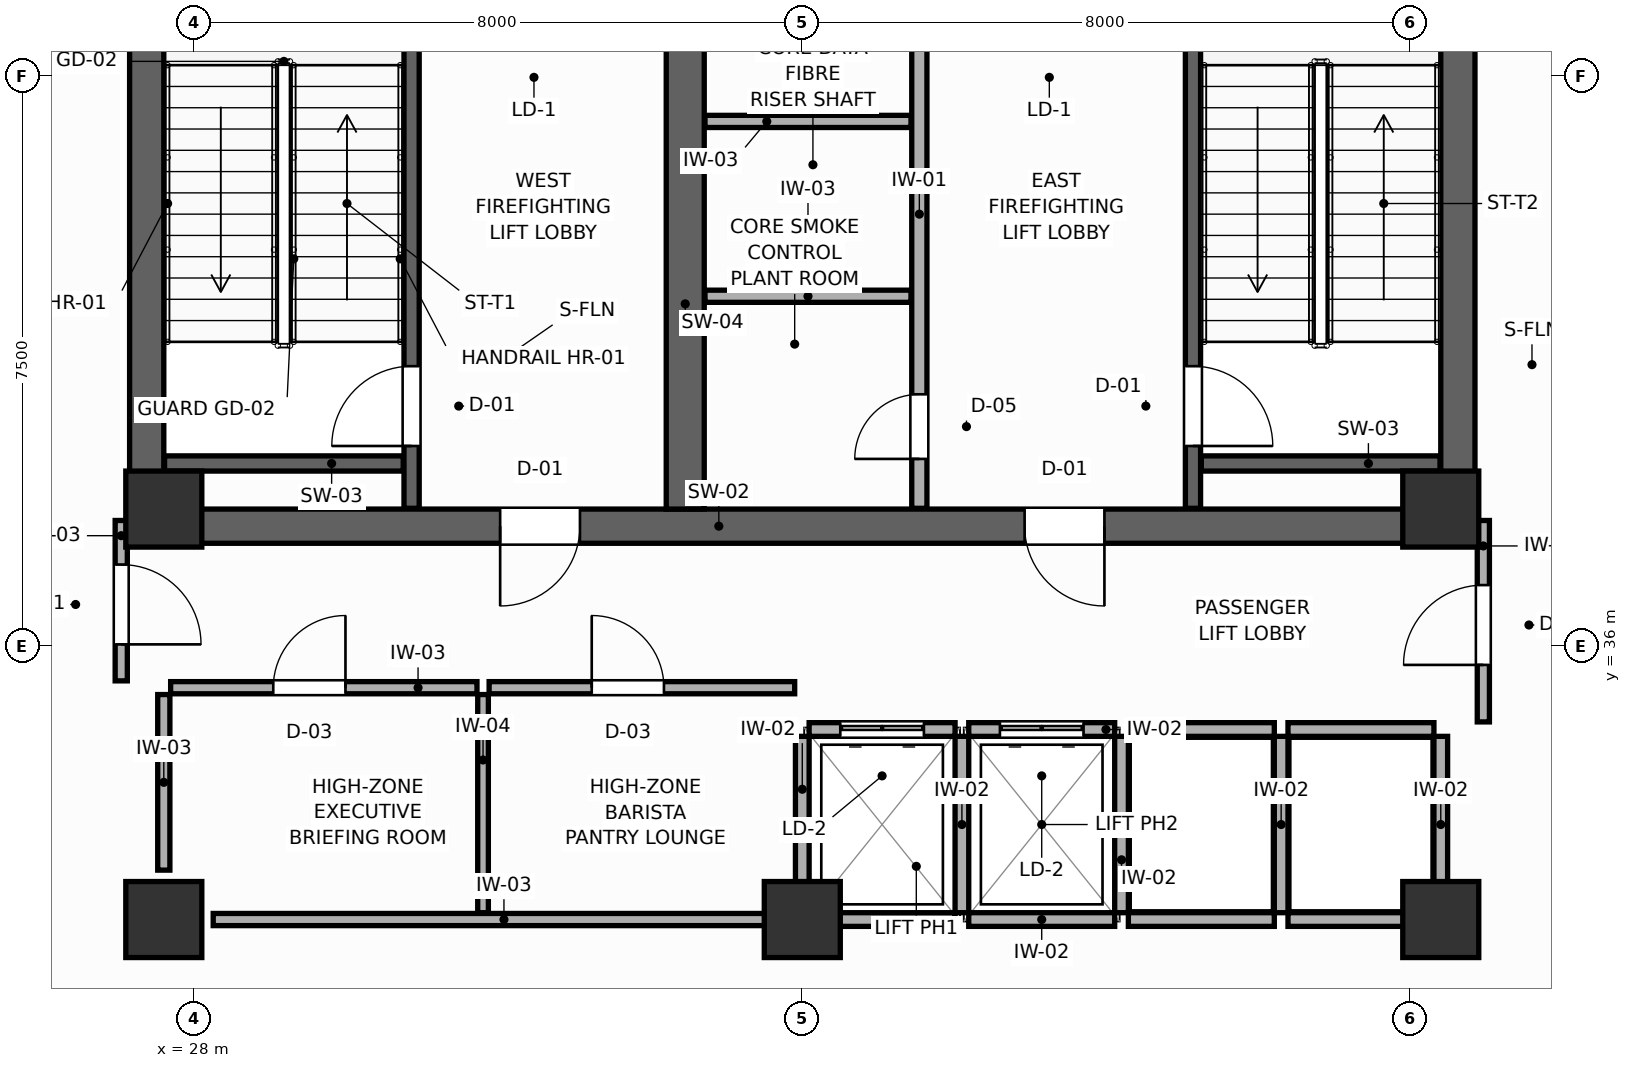
"""IFC4 building model, lengths in metres.
Left out: names, types, materials, properties, quantities, classifications, styles, units other than length and angle.
Written with IfcOpenShell. Run it as: python <this file> out.ifc"""

import sys

from ifc_helpers import new_model, si_unit, direction, frame, frame_2d, origin, origin_2d, place, context, subcontext, project, spatial, rectangle, extrude, source, transform, mapped, element, fill, save


model = new_model("IFC4")
c1 = context("Model", 3, precision=1e-05, world=origin(), true_north=direction((0.0, 1.0)))
c2 = subcontext(c1, "Body", "Model", "MODEL_VIEW")
j1 = project(units=[si_unit("LENGTHUNIT", "METRE"), si_unit("PLANEANGLEUNIT", "RADIAN")], contexts=[c1])
p1 = place(None, origin())
s1 = spatial("IfcSite", under=j1, at=p1, CompositionType="ELEMENT")
p2 = place(p1, origin())
s2 = spatial("IfcBuilding", under=s1, at=p2, CompositionType="ELEMENT")
p3 = place(p2, frame((0.0, 0.0, 201.0)))
s3 = spatial("IfcBuildingStorey", under=s2, at=p3, CompositionType="ELEMENT", Elevation=201.0)
p4 = place(p3, frame((27.15, 37.575, 0.0), z_axis=(0.0, 0.0, 1.0), x_axis=(1.0, 0.0, 0.0)))
e1 = element("IfcWall", 1, at=p4, inside=s3, PredefinedType="SHEAR", context=c2, shape_type="SweptSolid", body=[
    extrude(rectangle(XDim=17.7, YDim=0.45, at=frame_2d((8.85, 0.0))), origin(), (0.0, 0.0, 1.0), 4.8),
])
p5 = place(p4, frame((4.875, 0.0, 0.0)))
e2 = element("IfcOpeningElement", 2, at=p5, cuts=e1, PredefinedType="OPENING", context=c2, shape_type="SweptSolid", body=[
    extrude(rectangle(XDim=1.05, YDim=2.1, at=frame_2d((0.525, 1.05))), frame((0.0, 0.235, 0.0), z_axis=(0.0, -1.0, 0.0), x_axis=(1.0, 0.0, 0.0)), (0.0, 0.0, 1.0), 0.47),
])
p6 = place(p4, frame((11.775, 0.0, 0.0)))
e3 = element("IfcOpeningElement", 3, at=p6, cuts=e1, PredefinedType="OPENING", context=c2, shape_type="SweptSolid", body=[
    extrude(rectangle(XDim=1.05, YDim=2.1, at=frame_2d((0.525, 1.05))), frame((0.0, 0.235, 0.0), z_axis=(0.0, -1.0, 0.0), x_axis=(1.0, 0.0, 0.0)), (0.0, 0.0, 1.0), 0.47),
])
for number, where, z_axis, x_axis in (
    (4, (27.375, 37.8, 0.0), (0.0, 0.0, 1.0), (0.0, 1.0, 0.0)),
    (5, (44.625, 37.8, 0.0), (0.0, 0.0, 1.0), (0.0, 1.0, 0.0)),
):
    element("IfcWall", number, at=place(p3, frame(where, z_axis=z_axis, x_axis=x_axis)), inside=s3, PredefinedType="SHEAR", context=c2, shape_type="SweptSolid", body=[
        extrude(rectangle(XDim=9.0, YDim=0.45, at=frame_2d((4.5, 0.0))), origin(), (0.0, 0.0, 1.0), 4.8),
    ])
p7 = place(p3, frame((34.46, 37.8, 0.0), z_axis=(0.0, 0.0, 1.0), x_axis=(0.0, 1.0, 0.0)))
e6 = element("IfcWall", 6, at=p7, inside=s3, PredefinedType="SHEAR", context=c2, shape_type="SweptSolid", body=[
    extrude(rectangle(XDim=9.0, YDim=0.5, at=frame_2d((4.5, 0.0))), origin(), (0.0, 0.0, 1.0), 4.61),
])
m1 = source(origin(), c2, "Body", "SweptSolid", [
    extrude(rectangle(XDim=1.0, YDim=1.0, at=origin_2d()), origin(), (0.0, 0.0, 1.0), 4.8),
])
for number, where, z_axis, x_axis in (
    (7, (27.6, 37.8, 0.0), (0.0, 0.0, 1.0), (1.0, 0.0, 0.0)),
    (8, (44.4, 37.8, 0.0), (0.0, 0.0, 1.0), (1.0, 0.0, 0.0)),
    (9, (27.6, 32.4, 0.0), (0.0, 0.0, 1.0), (1.0, 0.0, 0.0)),
    (10, (44.4, 32.4, 0.0), (0.0, 0.0, 1.0), (1.0, 0.0, 0.0)),
    (11, (36.0, 32.4, 0.0), (0.0, 0.0, 1.0), (1.0, 0.0, 0.0)),
):
    element("IfcColumn", number, at=place(p3, frame(where, z_axis=z_axis, x_axis=x_axis)), inside=s3, PredefinedType="COLUMN", context=c2, shape_type="MappedRepresentation", body=[
        mapped(m1, transform((0.0, 0.0, 0.0), scale=1.0)),
    ])
p8 = place(p3, frame((30.86, 37.81, 0.0), z_axis=(0.0, 0.0, 1.0), x_axis=(0.0, 1.0, 0.0)))
e12 = element("IfcWall", 12, at=p8, inside=s3, PredefinedType="SHEAR", context=c2, shape_type="SweptSolid", body=[
    extrude(rectangle(XDim=8.98, YDim=0.2, at=frame_2d((4.49, 0.0))), origin(), (0.0, 0.0, 1.0), 4.8),
])
p9 = place(p8, frame((0.82, 0.0, 0.0)))
e13 = element("IfcOpeningElement", 13, at=p9, cuts=e12, PredefinedType="OPENING", context=c2, shape_type="SweptSolid", body=[
    extrude(rectangle(XDim=1.05, YDim=2.1, at=frame_2d((0.525, 1.05))), frame((0.0, 0.11, 0.0), z_axis=(0.0, -1.0, 0.0), x_axis=(1.0, 0.0, 0.0)), (0.0, 0.0, 1.0), 0.22),
])
p10 = place(p3, frame((27.61, 38.4, 0.0), z_axis=(0.0, 0.0, 1.0), x_axis=(1.0, 0.0, 0.0)))
e14 = element("IfcWall", 14, at=p10, inside=s3, PredefinedType="SHEAR", context=c2, shape_type="SweptSolid", body=[
    extrude(rectangle(XDim=3.14, YDim=0.2, at=frame_2d((1.57, 0.0))), origin(), (0.0, 0.0, 1.0), 4.8),
])
p11 = place(p3, frame((41.14, 37.81, 0.0), z_axis=(0.0, 0.0, 1.0), x_axis=(0.0, 1.0, 0.0)))
e15 = element("IfcWall", 15, at=p11, inside=s3, PredefinedType="SHEAR", context=c2, shape_type="SweptSolid", body=[
    extrude(rectangle(XDim=8.98, YDim=0.2, at=frame_2d((4.49, 0.0))), origin(), (0.0, 0.0, 1.0), 4.8),
])
p12 = place(p11, frame((0.82, 0.0, 0.0)))
e16 = element("IfcOpeningElement", 16, at=p12, cuts=e15, PredefinedType="OPENING", context=c2, shape_type="SweptSolid", body=[
    extrude(rectangle(XDim=1.05, YDim=2.1, at=frame_2d((0.525, 1.05))), frame((0.0, 0.11, 0.0), z_axis=(0.0, -1.0, 0.0), x_axis=(1.0, 0.0, 0.0)), (0.0, 0.0, 1.0), 0.22),
])
p13 = place(p3, frame((41.25, 38.4, 0.0), z_axis=(0.0, 0.0, 1.0), x_axis=(1.0, 0.0, 0.0)))
e17 = element("IfcWall", 17, at=p13, inside=s3, PredefinedType="SHEAR", context=c2, shape_type="SweptSolid", body=[
    extrude(rectangle(XDim=3.14, YDim=0.2, at=frame_2d((1.57, 0.0))), origin(), (0.0, 0.0, 1.0), 4.8),
])
p14 = place(p3, frame((37.54, 37.81, 0.0), z_axis=(0.0, 0.0, 1.0), x_axis=(0.0, 1.0, 0.0)))
e18 = element("IfcWall", 18, at=p14, inside=s3, PredefinedType="PARTITIONING", context=c2, shape_type="SweptSolid", body=[
    extrude(rectangle(XDim=8.98, YDim=0.2, at=frame_2d((4.49, 0.0))), origin(), (0.0, 0.0, 1.0), 4.61),
])
p15 = place(p14, frame((0.65, 0.0, 0.0)))
e19 = element("IfcOpeningElement", 19, at=p15, cuts=e18, PredefinedType="OPENING", context=c2, shape_type="SweptSolid", body=[
    extrude(rectangle(XDim=0.85, YDim=2.05, at=frame_2d((0.425, 1.025))), frame((0.0, 0.11, 0.0), z_axis=(0.0, -1.0, 0.0), x_axis=(1.0, 0.0, 0.0)), (0.0, 0.0, 1.0), 0.22),
])
for number, where, z_axis, x_axis in (
    (20, (34.72, 40.6, 0.0), (0.0, 0.0, 1.0), (1.0, 0.0, 0.0)),
    (21, (34.72, 42.9, 0.0), (0.0, 0.0, 1.0), (1.0, 0.0, 0.0)),
):
    element("IfcWall", number, at=place(p3, frame(where, z_axis=z_axis, x_axis=x_axis)), inside=s3, PredefinedType="PARTITIONING", context=c2, shape_type="SweptSolid", body=[
        extrude(rectangle(XDim=2.71, YDim=0.16, at=frame_2d((1.355, 0.0))), origin(), (0.0, 0.0, 1.0), 4.61),
    ])
p16 = place(p3, frame((36.09, 34.9, 0.0), z_axis=(0.0, 0.0, 1.0), x_axis=(1.0, 0.0, 0.0)))
e22 = element("IfcWall", 22, at=p16, inside=s3, PredefinedType="PARTITIONING", context=c2, shape_type="SweptSolid", body=[
    extrude(rectangle(XDim=1.92, YDim=0.18, at=frame_2d((0.96, 0.0))), origin(), (0.0, 0.0, 1.0), 4.61),
])
p17 = place(p16, frame((0.41, 0.0, 0.0)))
e23 = element("IfcOpeningElement", 23, at=p17, cuts=e22, PredefinedType="OPENING", context=c2, shape_type="SweptSolid", body=[
    extrude(rectangle(XDim=1.1, YDim=2.1, at=frame_2d((0.55, 1.05))), frame((0.0, 0.1, 0.0), z_axis=(0.0, -1.0, 0.0), x_axis=(1.0, 0.0, 0.0)), (0.0, 0.0, 1.0), 0.2),
])
p18 = place(p3, frame((36.09, 32.4, 0.0), z_axis=(0.0, 0.0, 1.0), x_axis=(1.0, 0.0, 0.0)))
e24 = element("IfcWall", 24, at=p18, inside=s3, PredefinedType="PARTITIONING", context=c2, shape_type="SweptSolid", body=[
    extrude(rectangle(XDim=1.92, YDim=0.18, at=frame_2d((0.96, 0.0))), origin(), (0.0, 0.0, 1.0), 2.57),
])
p19 = place(p3, frame((36.0, 32.49, 0.0), z_axis=(0.0, 0.0, 1.0), x_axis=(0.0, 1.0, 0.0)))
e25 = element("IfcWall", 25, at=p19, inside=s3, PredefinedType="PARTITIONING", context=c2, shape_type="SweptSolid", body=[
    extrude(rectangle(XDim=2.32, YDim=0.18, at=frame_2d((1.16, 0.0))), origin(), (0.0, 0.0, 1.0), 4.61),
])
p20 = place(p3, frame((38.19, 34.9, 0.0), z_axis=(0.0, 0.0, 1.0), x_axis=(1.0, 0.0, 0.0)))
e26 = element("IfcWall", 26, at=p20, inside=s3, PredefinedType="PARTITIONING", context=c2, shape_type="SweptSolid", body=[
    extrude(rectangle(XDim=1.92, YDim=0.18, at=frame_2d((0.96, 0.0))), origin(), (0.0, 0.0, 1.0), 4.61),
])
p21 = place(p20, frame((0.41, 0.0, 0.0)))
e27 = element("IfcOpeningElement", 27, at=p21, cuts=e26, PredefinedType="OPENING", context=c2, shape_type="SweptSolid", body=[
    extrude(rectangle(XDim=1.1, YDim=2.1, at=frame_2d((0.55, 1.05))), frame((0.0, 0.1, 0.0), z_axis=(0.0, -1.0, 0.0), x_axis=(1.0, 0.0, 0.0)), (0.0, 0.0, 1.0), 0.2),
])
p22 = place(p3, frame((38.19, 32.4, 0.0), z_axis=(0.0, 0.0, 1.0), x_axis=(1.0, 0.0, 0.0)))
e28 = element("IfcWall", 28, at=p22, inside=s3, PredefinedType="PARTITIONING", context=c2, shape_type="SweptSolid", body=[
    extrude(rectangle(XDim=1.92, YDim=0.18, at=frame_2d((0.96, 0.0))), origin(), (0.0, 0.0, 1.0), 2.57),
])
p23 = place(p3, frame((38.1, 32.49, 0.0), z_axis=(0.0, 0.0, 1.0), x_axis=(0.0, 1.0, 0.0)))
e29 = element("IfcWall", 29, at=p23, inside=s3, PredefinedType="PARTITIONING", context=c2, shape_type="SweptSolid", body=[
    extrude(rectangle(XDim=2.32, YDim=0.18, at=frame_2d((1.16, 0.0))), origin(), (0.0, 0.0, 1.0), 4.61),
])
p24 = place(p3, frame((40.29, 34.9, 0.0), z_axis=(0.0, 0.0, 1.0), x_axis=(1.0, 0.0, 0.0)))
e30 = element("IfcWall", 30, at=p24, inside=s3, PredefinedType="PARTITIONING", context=c2, shape_type="SweptSolid", body=[
    extrude(rectangle(XDim=1.92, YDim=0.18, at=frame_2d((0.96, 0.0))), origin(), (0.0, 0.0, 1.0), 4.61),
])
p25 = place(p3, frame((40.29, 32.4, 0.0), z_axis=(0.0, 0.0, 1.0), x_axis=(1.0, 0.0, 0.0)))
e31 = element("IfcWall", 31, at=p25, inside=s3, PredefinedType="PARTITIONING", context=c2, shape_type="SweptSolid", body=[
    extrude(rectangle(XDim=1.92, YDim=0.18, at=frame_2d((0.96, 0.0))), origin(), (0.0, 0.0, 1.0), 2.57),
])
p26 = place(p3, frame((40.2, 32.49, 0.0), z_axis=(0.0, 0.0, 1.0), x_axis=(0.0, 1.0, 0.0)))
e32 = element("IfcWall", 32, at=p26, inside=s3, PredefinedType="PARTITIONING", context=c2, shape_type="SweptSolid", body=[
    extrude(rectangle(XDim=2.32, YDim=0.18, at=frame_2d((1.16, 0.0))), origin(), (0.0, 0.0, 1.0), 4.61),
])
p27 = place(p3, frame((42.39, 34.9, 0.0), z_axis=(0.0, 0.0, 1.0), x_axis=(1.0, 0.0, 0.0)))
e33 = element("IfcWall", 33, at=p27, inside=s3, PredefinedType="PARTITIONING", context=c2, shape_type="SweptSolid", body=[
    extrude(rectangle(XDim=1.92, YDim=0.18, at=frame_2d((0.96, 0.0))), origin(), (0.0, 0.0, 1.0), 4.61),
])
p28 = place(p3, frame((42.39, 32.4, 0.0), z_axis=(0.0, 0.0, 1.0), x_axis=(1.0, 0.0, 0.0)))
e34 = element("IfcWall", 34, at=p28, inside=s3, PredefinedType="PARTITIONING", context=c2, shape_type="SweptSolid", body=[
    extrude(rectangle(XDim=1.92, YDim=0.18, at=frame_2d((0.96, 0.0))), origin(), (0.0, 0.0, 1.0), 2.57),
])
for number, where, z_axis, x_axis in (
    (35, (42.3, 32.49, 0.0), (0.0, 0.0, 1.0), (0.0, 1.0, 0.0)),
    (36, (44.4, 32.49, 0.0), (0.0, 0.0, 1.0), (0.0, 1.0, 0.0)),
):
    element("IfcWall", number, at=place(p3, frame(where, z_axis=z_axis, x_axis=x_axis)), inside=s3, PredefinedType="PARTITIONING", context=c2, shape_type="SweptSolid", body=[
        extrude(rectangle(XDim=2.32, YDim=0.18, at=frame_2d((1.16, 0.0))), origin(), (0.0, 0.0, 1.0), 4.61),
    ])
p29 = place(p3, frame((28.25, 32.4, 0.0), z_axis=(0.0, 0.0, 1.0), x_axis=(1.0, 0.0, 0.0)))
e37 = element("IfcWall", 37, at=p29, inside=s3, PredefinedType="PARTITIONING", context=c2, shape_type="SweptSolid", body=[
    extrude(rectangle(XDim=7.65, YDim=0.16, at=frame_2d((3.825, 0.0))), origin(), (0.0, 0.0, 1.0), 2.57),
])
p30 = place(p3, frame((27.6, 33.05, 0.0), z_axis=(0.0, 0.0, 1.0), x_axis=(0.0, 1.0, 0.0)))
e38 = element("IfcWall", 38, at=p30, inside=s3, PredefinedType="PARTITIONING", context=c2, shape_type="SweptSolid", body=[
    extrude(rectangle(XDim=2.31, YDim=0.16, at=frame_2d((1.155, 0.0))), origin(), (0.0, 0.0, 1.0), 4.61),
])
p31 = place(p3, frame((31.8, 32.49, 0.0), z_axis=(0.0, 0.0, 1.0), x_axis=(0.0, 1.0, 0.0)))
e39 = element("IfcWall", 39, at=p31, inside=s3, PredefinedType="PARTITIONING", context=c2, shape_type="SweptSolid", body=[
    extrude(rectangle(XDim=2.87, YDim=0.14, at=frame_2d((1.435, 0.0))), origin(), (0.0, 0.0, 1.0), 4.61),
])
p32 = place(p3, frame((27.69, 35.45, 0.0), z_axis=(0.0, 0.0, 1.0), x_axis=(1.0, 0.0, 0.0)))
e40 = element("IfcWall", 40, at=p32, inside=s3, PredefinedType="PARTITIONING", context=c2, shape_type="SweptSolid", body=[
    extrude(rectangle(XDim=4.03, YDim=0.16, at=frame_2d((2.015, 0.0))), origin(), (0.0, 0.0, 1.0), 4.61),
])
p33 = place(p32, frame((1.35, 0.0, 0.0)))
e41 = element("IfcOpeningElement", 41, at=p33, cuts=e40, PredefinedType="OPENING", context=c2, shape_type="SweptSolid", body=[
    extrude(rectangle(XDim=0.95, YDim=2.05, at=frame_2d((0.475, 1.025))), frame((0.0, 0.09, 0.0), z_axis=(0.0, -1.0, 0.0), x_axis=(1.0, 0.0, 0.0)), (0.0, 0.0, 1.0), 0.18),
])
p34 = place(p3, frame((31.88, 35.45, 0.0), z_axis=(0.0, 0.0, 1.0), x_axis=(1.0, 0.0, 0.0)))
e42 = element("IfcWall", 42, at=p34, inside=s3, PredefinedType="PARTITIONING", context=c2, shape_type="SweptSolid", body=[
    extrude(rectangle(XDim=4.02, YDim=0.16, at=frame_2d((2.01, 0.0))), origin(), (0.0, 0.0, 1.0), 4.61),
])
p35 = place(p34, frame((1.35, 0.0, 0.0)))
e43 = element("IfcOpeningElement", 43, at=p35, cuts=e42, PredefinedType="OPENING", context=c2, shape_type="SweptSolid", body=[
    extrude(rectangle(XDim=0.95, YDim=2.05, at=frame_2d((0.475, 1.025))), frame((0.0, 0.09, 0.0), z_axis=(0.0, -1.0, 0.0), x_axis=(1.0, 0.0, 0.0)), (0.0, 0.0, 1.0), 0.18),
])
p36 = place(p3, frame((27.04, 35.54, 0.0), z_axis=(0.0, 0.0, 1.0), x_axis=(0.0, 1.0, 0.0)))
e44 = element("IfcWall", 44, at=p36, inside=s3, PredefinedType="PARTITIONING", context=c2, shape_type="SweptSolid", body=[
    extrude(rectangle(XDim=2.11, YDim=0.16, at=frame_2d((1.055, 0.0))), origin(), (0.0, 0.0, 1.0), 4.61),
])
p37 = place(p36, frame((0.48, 0.0, 0.0)))
e45 = element("IfcOpeningElement", 45, at=p37, cuts=e44, PredefinedType="OPENING", context=c2, shape_type="SweptSolid", body=[
    extrude(rectangle(XDim=1.05, YDim=2.1, at=frame_2d((0.525, 1.05))), frame((0.0, 0.09, 0.0), z_axis=(0.0, -1.0, 0.0), x_axis=(1.0, 0.0, 0.0)), (0.0, 0.0, 1.0), 0.18),
])
p38 = place(p3, frame((44.96, 35.0, 0.0), z_axis=(0.0, 0.0, 1.0), x_axis=(0.0, 1.0, 0.0)))
e46 = element("IfcWall", 46, at=p38, inside=s3, PredefinedType="PARTITIONING", context=c2, shape_type="SweptSolid", body=[
    extrude(rectangle(XDim=2.65, YDim=0.16, at=frame_2d((1.325, 0.0))), origin(), (0.0, 0.0, 1.0), 4.61),
])
p39 = place(p38, frame((0.75, 0.0, 0.0)))
e47 = element("IfcOpeningElement", 47, at=p39, cuts=e46, PredefinedType="OPENING", context=c2, shape_type="SweptSolid", body=[
    extrude(rectangle(XDim=1.05, YDim=2.1, at=frame_2d((0.525, 1.05))), frame((0.0, 0.09, 0.0), z_axis=(0.0, -1.0, 0.0), x_axis=(1.0, 0.0, 0.0)), (0.0, 0.0, 1.0), 0.18),
])
p40 = place(p9, origin())
e48 = element("IfcDoor", 48, at=p40, inside=s3, OperationType="SINGLE_SWING_LEFT", PredefinedType="DOOR", context=c2, shape_type="SweptSolid", body=[
    extrude(rectangle(XDim=1.05, YDim=2.1, at=frame_2d((0.525, 1.05))), frame((0.0, 0.025, 0.0), z_axis=(0.0, -1.0, 0.0), x_axis=(1.0, 0.0, 0.0)), (0.0, 0.0, 1.0), 0.05),
])
fill(e13, e48)
p41 = place(p12, frame((1.05, 0.0, 0.0), z_axis=(0.0, 0.0, 1.0), x_axis=(-1.0, 0.0, 0.0)))
e49 = element("IfcDoor", 49, at=p41, inside=s3, OperationType="SINGLE_SWING_RIGHT", PredefinedType="DOOR", context=c2, shape_type="SweptSolid", body=[
    extrude(rectangle(XDim=1.05, YDim=2.1, at=frame_2d((0.525, 1.05))), frame((0.0, 0.025, 0.0), z_axis=(0.0, -1.0, 0.0), x_axis=(1.0, 0.0, 0.0)), (0.0, 0.0, 1.0), 0.05),
])
fill(e16, e49)
p42 = place(p15, origin())
e50 = element("IfcDoor", 50, at=p42, inside=s3, OperationType="SINGLE_SWING_LEFT", PredefinedType="DOOR", context=c2, shape_type="SweptSolid", body=[
    extrude(rectangle(XDim=0.85, YDim=2.05, at=frame_2d((0.425, 1.025))), frame((0.0, 0.025, 0.0), z_axis=(0.0, -1.0, 0.0), x_axis=(1.0, 0.0, 0.0)), (0.0, 0.0, 1.0), 0.05),
])
fill(e19, e50)
p43 = place(p17, origin())
e51 = element("IfcDoor", 51, at=p43, inside=s3, OperationType="DOUBLE_DOOR_SLIDING", PredefinedType="DOOR", context=c2, shape_type="SweptSolid", body=[
    extrude(rectangle(XDim=1.1, YDim=2.1, at=frame_2d((0.55, 1.05))), frame((0.0, 0.025, 0.0), z_axis=(0.0, -1.0, 0.0), x_axis=(1.0, 0.0, 0.0)), (0.0, 0.0, 1.0), 0.05),
])
fill(e23, e51)
p44 = place(p21, origin())
e52 = element("IfcDoor", 52, at=p44, inside=s3, OperationType="DOUBLE_DOOR_SLIDING", PredefinedType="DOOR", context=c2, shape_type="SweptSolid", body=[
    extrude(rectangle(XDim=1.1, YDim=2.1, at=frame_2d((0.55, 1.05))), frame((0.0, 0.025, 0.0), z_axis=(0.0, -1.0, 0.0), x_axis=(1.0, 0.0, 0.0)), (0.0, 0.0, 1.0), 0.05),
])
fill(e27, e52)
p45 = place(p33, origin())
e53 = element("IfcDoor", 53, at=p45, inside=s3, OperationType="SINGLE_SWING_RIGHT", PredefinedType="DOOR", context=c2, shape_type="SweptSolid", body=[
    extrude(rectangle(XDim=0.95, YDim=2.05, at=frame_2d((0.475, 1.025))), frame((0.0, 0.025, 0.0), z_axis=(0.0, -1.0, 0.0), x_axis=(1.0, 0.0, 0.0)), (0.0, 0.0, 1.0), 0.05),
])
fill(e41, e53)
p46 = place(p35, origin())
e54 = element("IfcDoor", 54, at=p46, inside=s3, OperationType="SINGLE_SWING_LEFT", PredefinedType="DOOR", context=c2, shape_type="SweptSolid", body=[
    extrude(rectangle(XDim=0.95, YDim=2.05, at=frame_2d((0.475, 1.025))), frame((0.0, 0.025, 0.0), z_axis=(0.0, -1.0, 0.0), x_axis=(1.0, 0.0, 0.0)), (0.0, 0.0, 1.0), 0.05),
])
fill(e43, e54)
p47 = place(p37, frame((1.05, 0.0, 0.0), z_axis=(0.0, 0.0, 1.0), x_axis=(-1.0, 0.0, 0.0)))
e55 = element("IfcDoor", 55, at=p47, inside=s3, OperationType="SINGLE_SWING_RIGHT", PredefinedType="DOOR", context=c2, shape_type="SweptSolid", body=[
    extrude(rectangle(XDim=1.05, YDim=2.1, at=frame_2d((0.525, 1.05))), frame((0.0, 0.025, 0.0), z_axis=(0.0, -1.0, 0.0), x_axis=(1.0, 0.0, 0.0)), (0.0, 0.0, 1.0), 0.05),
])
fill(e45, e55)
p48 = place(p39, origin())
e56 = element("IfcDoor", 56, at=p48, inside=s3, OperationType="SINGLE_SWING_LEFT", PredefinedType="DOOR", context=c2, shape_type="SweptSolid", body=[
    extrude(rectangle(XDim=1.05, YDim=2.1, at=frame_2d((0.525, 1.05))), frame((0.0, 0.025, 0.0), z_axis=(0.0, -1.0, 0.0), x_axis=(1.0, 0.0, 0.0)), (0.0, 0.0, 1.0), 0.05),
])
fill(e47, e56)
p49 = place(p5, frame((1.05, 0.0, 0.0), z_axis=(0.0, 0.0, 1.0), x_axis=(-1.0, 0.0, 0.0)))
e57 = element("IfcDoor", 57, at=p49, inside=s3, OperationType="SINGLE_SWING_RIGHT", PredefinedType="DOOR", context=c2, shape_type="SweptSolid", body=[
    extrude(rectangle(XDim=1.05, YDim=2.1, at=frame_2d((0.525, 1.05))), frame((0.0, 0.025, 0.0), z_axis=(0.0, -1.0, 0.0), x_axis=(1.0, 0.0, 0.0)), (0.0, 0.0, 1.0), 0.05),
])
fill(e2, e57)
p50 = place(p6, frame((1.05, 0.0, 0.0), z_axis=(0.0, 0.0, 1.0), x_axis=(-1.0, 0.0, 0.0)))
e58 = element("IfcDoor", 58, at=p50, inside=s3, OperationType="SINGLE_SWING_LEFT", PredefinedType="DOOR", context=c2, shape_type="SweptSolid", body=[
    extrude(rectangle(XDim=1.05, YDim=2.1, at=frame_2d((0.525, 1.05))), frame((0.0, 0.025, 0.0), z_axis=(0.0, -1.0, 0.0), x_axis=(1.0, 0.0, 0.0)), (0.0, 0.0, 1.0), 0.05),
])
fill(e3, e58)
save(model, sys.argv[1])
